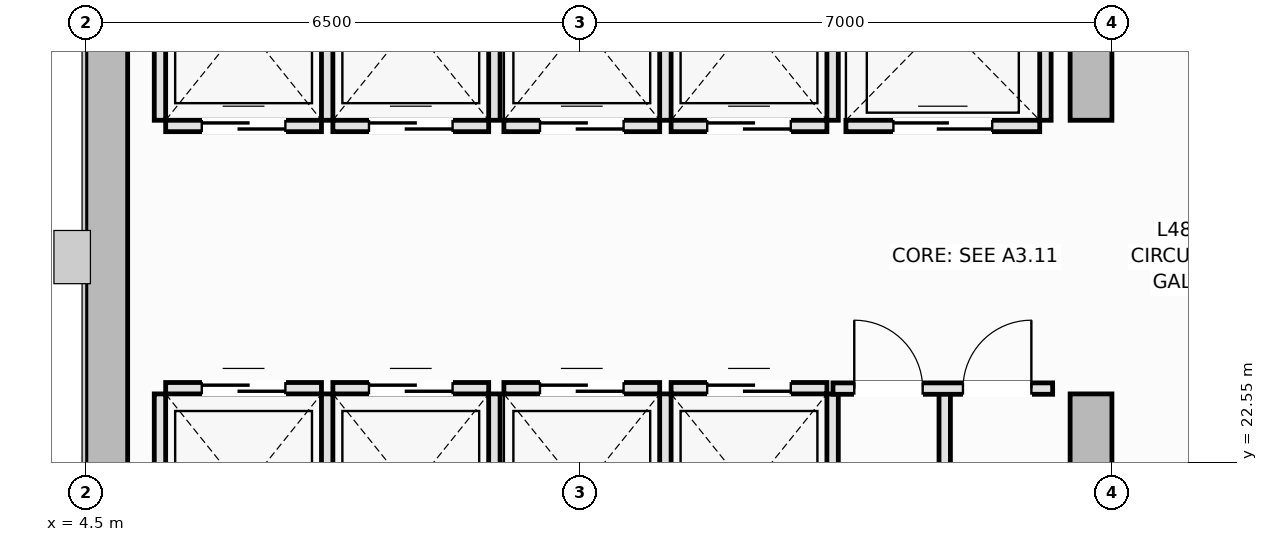
"""IFC4 building model, lengths in metres.
Left out: names, types, materials, properties, quantities, classifications, styles, units other than length and angle.
Written with IfcOpenShell. Run it as: python <this file> out.ifc"""

import sys

from ifc_helpers import new_model, si_unit, direction, frame, frame_2d, origin, place, context, subcontext, project, spatial, rectangle, extrude, element, fill, save


model = new_model("IFC4")
c1 = context("Model", 3, precision=1e-05, world=origin(), true_north=direction((0.0, 1.0)))
c2 = subcontext(c1, "Body", "Model", "MODEL_VIEW")
j1 = project(units=[si_unit("LENGTHUNIT", "METRE"), si_unit("PLANEANGLEUNIT", "RADIAN")], contexts=[c1])
p1 = place(None, origin())
s1 = spatial("IfcSite", under=j1, at=p1, CompositionType="ELEMENT")
p2 = place(p1, origin())
s2 = spatial("IfcBuilding", under=s1, at=p2, CompositionType="ELEMENT")
p3 = place(p2, frame((0.0, 0.0, 183.65)))
s3 = spatial("IfcBuildingStorey", under=s2, at=p3, CompositionType="ELEMENT", Elevation=183.65)
p4 = place(p3, frame((4.775, 14.55, 0.0), z_axis=(0.0, 0.0, 1.0), x_axis=(0.0, 1.0, 0.0)))
e1 = element("IfcWall", 1, at=p4, inside=s3, PredefinedType="SHEAR", context=c2, shape_type="SweptSolid", body=[
    extrude(rectangle(XDim=21.4, YDim=0.55, at=frame_2d((10.7, 0.0))), origin(), (0.0, 0.0, 1.0), 4.4),
])
p5 = place(p3, frame((17.725, 14.55, 0.0), z_axis=(0.0, 0.0, 1.0), x_axis=(0.0, 1.0, 0.0)))
e2 = element("IfcWall", 2, at=p5, inside=s3, PredefinedType="SHEAR", context=c2, shape_type="SweptSolid", body=[
    extrude(rectangle(XDim=8.9, YDim=0.55, at=frame_2d((4.45, 0.0))), origin(), (0.0, 0.0, 1.0), 4.4),
])
p6 = place(p5, frame((4.35, 0.0, 0.0)))
e3 = element("IfcOpeningElement", 3, at=p6, cuts=e2, PredefinedType="OPENING", context=c2, shape_type="SweptSolid", body=[
    extrude(rectangle(XDim=1.1, YDim=2.15, at=frame_2d((0.55, 1.075))), frame((0.0, 0.285, 0.0), z_axis=(0.0, -1.0, 0.0), x_axis=(1.0, 0.0, 0.0)), (0.0, 0.0, 1.0), 0.57),
])
p7 = place(p3, frame((17.725, 27.05, 0.0), z_axis=(0.0, 0.0, 1.0), x_axis=(0.0, 1.0, 0.0)))
e4 = element("IfcWall", 4, at=p7, inside=s3, PredefinedType="SHEAR", context=c2, shape_type="SweptSolid", body=[
    extrude(rectangle(XDim=8.9, YDim=0.55, at=frame_2d((4.45, 0.0))), origin(), (0.0, 0.0, 1.0), 4.4),
])
p8 = place(p7, frame((3.45, 0.0, 0.0)))
e5 = element("IfcOpeningElement", 5, at=p8, cuts=e4, PredefinedType="OPENING", context=c2, shape_type="SweptSolid", body=[
    extrude(rectangle(XDim=1.1, YDim=2.15, at=frame_2d((0.55, 1.075))), frame((0.0, 0.285, 0.0), z_axis=(0.0, -1.0, 0.0), x_axis=(1.0, 0.0, 0.0)), (0.0, 0.0, 1.0), 0.57),
])
p9 = place(p3, frame((5.55, 23.525, 0.0), z_axis=(0.0, 0.0, 1.0), x_axis=(1.0, 0.0, 0.0)))
e6 = element("IfcWall", 6, at=p9, inside=s3, PredefinedType="PARTITIONING", context=c2, shape_type="SweptSolid", body=[
    extrude(rectangle(XDim=2.05, YDim=0.15, at=frame_2d((1.025, 0.0))), origin(), (0.0, 0.0, 1.0), 4.22),
])
p10 = place(p9, frame((0.475, 0.0, 0.0)))
e7 = element("IfcOpeningElement", 7, at=p10, cuts=e6, PredefinedType="OPENING", context=c2, shape_type="SweptSolid", body=[
    extrude(rectangle(XDim=1.1, YDim=2.2, at=frame_2d((0.55, 1.1))), frame((0.0, 0.085, 0.0), z_axis=(0.0, -1.0, 0.0), x_axis=(1.0, 0.0, 0.0)), (0.0, 0.0, 1.0), 0.17),
])
for number, where, z_axis, x_axis in (
    (8, (5.475, 20.9, 0.0), (0.0, 0.0, 1.0), (0.0, 1.0, 0.0)),
    (9, (7.675, 20.9, 0.0), (0.0, 0.0, 1.0), (0.0, 1.0, 0.0)),
):
    element("IfcWall", number, at=place(p3, frame(where, z_axis=z_axis, x_axis=x_axis)), inside=s3, PredefinedType="PARTITIONING", context=c2, shape_type="SweptSolid", body=[
        extrude(rectangle(XDim=2.55, YDim=0.15, at=frame_2d((1.275, 0.0))), origin(), (0.0, 0.0, 1.0), 4.22),
    ])
p11 = place(p3, frame((7.75, 23.525, 0.0), z_axis=(0.0, 0.0, 1.0), x_axis=(1.0, 0.0, 0.0)))
e10 = element("IfcWall", 10, at=p11, inside=s3, PredefinedType="PARTITIONING", context=c2, shape_type="SweptSolid", body=[
    extrude(rectangle(XDim=2.05, YDim=0.15, at=frame_2d((1.025, 0.0))), origin(), (0.0, 0.0, 1.0), 4.22),
])
p12 = place(p11, frame((0.475, 0.0, 0.0)))
e11 = element("IfcOpeningElement", 11, at=p12, cuts=e10, PredefinedType="OPENING", context=c2, shape_type="SweptSolid", body=[
    extrude(rectangle(XDim=1.1, YDim=2.2, at=frame_2d((0.55, 1.1))), frame((0.0, 0.085, 0.0), z_axis=(0.0, -1.0, 0.0), x_axis=(1.0, 0.0, 0.0)), (0.0, 0.0, 1.0), 0.17),
])
p13 = place(p3, frame((9.875, 20.9, 0.0), z_axis=(0.0, 0.0, 1.0), x_axis=(0.0, 1.0, 0.0)))
e12 = element("IfcWall", 12, at=p13, inside=s3, PredefinedType="PARTITIONING", context=c2, shape_type="SweptSolid", body=[
    extrude(rectangle(XDim=2.55, YDim=0.15, at=frame_2d((1.275, 0.0))), origin(), (0.0, 0.0, 1.0), 4.22),
])
p14 = place(p3, frame((5.55, 26.975, 0.0), z_axis=(0.0, 0.0, 1.0), x_axis=(1.0, 0.0, 0.0)))
e13 = element("IfcWall", 13, at=p14, inside=s3, PredefinedType="PARTITIONING", context=c2, shape_type="SweptSolid", body=[
    extrude(rectangle(XDim=2.05, YDim=0.15, at=frame_2d((1.025, 0.0))), origin(), (0.0, 0.0, 1.0), 4.22),
])
p15 = place(p14, frame((0.475, 0.0, 0.0)))
e14 = element("IfcOpeningElement", 14, at=p15, cuts=e13, PredefinedType="OPENING", context=c2, shape_type="SweptSolid", body=[
    extrude(rectangle(XDim=1.1, YDim=2.2, at=frame_2d((0.55, 1.1))), frame((0.0, 0.085, 0.0), z_axis=(0.0, -1.0, 0.0), x_axis=(1.0, 0.0, 0.0)), (0.0, 0.0, 1.0), 0.17),
])
for number, where, z_axis, x_axis in (
    (15, (5.475, 27.05, 0.0), (0.0, 0.0, 1.0), (0.0, 1.0, 0.0)),
    (16, (7.675, 27.05, 0.0), (0.0, 0.0, 1.0), (0.0, 1.0, 0.0)),
):
    element("IfcWall", number, at=place(p3, frame(where, z_axis=z_axis, x_axis=x_axis)), inside=s3, PredefinedType="PARTITIONING", context=c2, shape_type="SweptSolid", body=[
        extrude(rectangle(XDim=2.55, YDim=0.15, at=frame_2d((1.275, 0.0))), origin(), (0.0, 0.0, 1.0), 4.22),
    ])
p16 = place(p3, frame((7.75, 26.975, 0.0), z_axis=(0.0, 0.0, 1.0), x_axis=(1.0, 0.0, 0.0)))
e17 = element("IfcWall", 17, at=p16, inside=s3, PredefinedType="PARTITIONING", context=c2, shape_type="SweptSolid", body=[
    extrude(rectangle(XDim=2.05, YDim=0.15, at=frame_2d((1.025, 0.0))), origin(), (0.0, 0.0, 1.0), 4.22),
])
p17 = place(p16, frame((0.475, 0.0, 0.0)))
e18 = element("IfcOpeningElement", 18, at=p17, cuts=e17, PredefinedType="OPENING", context=c2, shape_type="SweptSolid", body=[
    extrude(rectangle(XDim=1.1, YDim=2.2, at=frame_2d((0.55, 1.1))), frame((0.0, 0.085, 0.0), z_axis=(0.0, -1.0, 0.0), x_axis=(1.0, 0.0, 0.0)), (0.0, 0.0, 1.0), 0.17),
])
p18 = place(p3, frame((9.875, 27.05, 0.0), z_axis=(0.0, 0.0, 1.0), x_axis=(0.0, 1.0, 0.0)))
e19 = element("IfcWall", 19, at=p18, inside=s3, PredefinedType="PARTITIONING", context=c2, shape_type="SweptSolid", body=[
    extrude(rectangle(XDim=2.55, YDim=0.15, at=frame_2d((1.275, 0.0))), origin(), (0.0, 0.0, 1.0), 4.22),
])
p19 = place(p3, frame((10.0, 23.525, 0.0), z_axis=(0.0, 0.0, 1.0), x_axis=(1.0, 0.0, 0.0)))
e20 = element("IfcWall", 20, at=p19, inside=s3, PredefinedType="PARTITIONING", context=c2, shape_type="SweptSolid", body=[
    extrude(rectangle(XDim=2.05, YDim=0.15, at=frame_2d((1.025, 0.0))), origin(), (0.0, 0.0, 1.0), 4.22),
])
p20 = place(p19, frame((0.475, 0.0, 0.0)))
e21 = element("IfcOpeningElement", 21, at=p20, cuts=e20, PredefinedType="OPENING", context=c2, shape_type="SweptSolid", body=[
    extrude(rectangle(XDim=1.1, YDim=2.2, at=frame_2d((0.55, 1.1))), frame((0.0, 0.085, 0.0), z_axis=(0.0, -1.0, 0.0), x_axis=(1.0, 0.0, 0.0)), (0.0, 0.0, 1.0), 0.17),
])
p21 = place(p3, frame((12.125, 20.9, 0.0), z_axis=(0.0, 0.0, 1.0), x_axis=(0.0, 1.0, 0.0)))
e22 = element("IfcWall", 22, at=p21, inside=s3, PredefinedType="PARTITIONING", context=c2, shape_type="SweptSolid", body=[
    extrude(rectangle(XDim=2.55, YDim=0.15, at=frame_2d((1.275, 0.0))), origin(), (0.0, 0.0, 1.0), 4.22),
])
p22 = place(p3, frame((12.2, 23.525, 0.0), z_axis=(0.0, 0.0, 1.0), x_axis=(1.0, 0.0, 0.0)))
e23 = element("IfcWall", 23, at=p22, inside=s3, PredefinedType="PARTITIONING", context=c2, shape_type="SweptSolid", body=[
    extrude(rectangle(XDim=2.05, YDim=0.15, at=frame_2d((1.025, 0.0))), origin(), (0.0, 0.0, 1.0), 4.22),
])
p23 = place(p22, frame((0.475, 0.0, 0.0)))
e24 = element("IfcOpeningElement", 24, at=p23, cuts=e23, PredefinedType="OPENING", context=c2, shape_type="SweptSolid", body=[
    extrude(rectangle(XDim=1.1, YDim=2.2, at=frame_2d((0.55, 1.1))), frame((0.0, 0.085, 0.0), z_axis=(0.0, -1.0, 0.0), x_axis=(1.0, 0.0, 0.0)), (0.0, 0.0, 1.0), 0.17),
])
p24 = place(p3, frame((14.325, 20.9, 0.0), z_axis=(0.0, 0.0, 1.0), x_axis=(0.0, 1.0, 0.0)))
e25 = element("IfcWall", 25, at=p24, inside=s3, PredefinedType="PARTITIONING", context=c2, shape_type="SweptSolid", body=[
    extrude(rectangle(XDim=2.55, YDim=0.15, at=frame_2d((1.275, 0.0))), origin(), (0.0, 0.0, 1.0), 4.22),
])
p25 = place(p3, frame((10.0, 26.975, 0.0), z_axis=(0.0, 0.0, 1.0), x_axis=(1.0, 0.0, 0.0)))
e26 = element("IfcWall", 26, at=p25, inside=s3, PredefinedType="PARTITIONING", context=c2, shape_type="SweptSolid", body=[
    extrude(rectangle(XDim=2.05, YDim=0.15, at=frame_2d((1.025, 0.0))), origin(), (0.0, 0.0, 1.0), 4.22),
])
p26 = place(p25, frame((0.475, 0.0, 0.0)))
e27 = element("IfcOpeningElement", 27, at=p26, cuts=e26, PredefinedType="OPENING", context=c2, shape_type="SweptSolid", body=[
    extrude(rectangle(XDim=1.1, YDim=2.2, at=frame_2d((0.55, 1.1))), frame((0.0, 0.085, 0.0), z_axis=(0.0, -1.0, 0.0), x_axis=(1.0, 0.0, 0.0)), (0.0, 0.0, 1.0), 0.17),
])
p27 = place(p3, frame((12.125, 27.05, 0.0), z_axis=(0.0, 0.0, 1.0), x_axis=(0.0, 1.0, 0.0)))
e28 = element("IfcWall", 28, at=p27, inside=s3, PredefinedType="PARTITIONING", context=c2, shape_type="SweptSolid", body=[
    extrude(rectangle(XDim=2.55, YDim=0.15, at=frame_2d((1.275, 0.0))), origin(), (0.0, 0.0, 1.0), 4.22),
])
p28 = place(p3, frame((12.2, 26.975, 0.0), z_axis=(0.0, 0.0, 1.0), x_axis=(1.0, 0.0, 0.0)))
e29 = element("IfcWall", 29, at=p28, inside=s3, PredefinedType="PARTITIONING", context=c2, shape_type="SweptSolid", body=[
    extrude(rectangle(XDim=2.05, YDim=0.15, at=frame_2d((1.025, 0.0))), origin(), (0.0, 0.0, 1.0), 4.22),
])
p29 = place(p28, frame((0.475, 0.0, 0.0)))
e30 = element("IfcOpeningElement", 30, at=p29, cuts=e29, PredefinedType="OPENING", context=c2, shape_type="SweptSolid", body=[
    extrude(rectangle(XDim=1.1, YDim=2.2, at=frame_2d((0.55, 1.1))), frame((0.0, 0.085, 0.0), z_axis=(0.0, -1.0, 0.0), x_axis=(1.0, 0.0, 0.0)), (0.0, 0.0, 1.0), 0.17),
])
p30 = place(p3, frame((14.325, 27.05, 0.0), z_axis=(0.0, 0.0, 1.0), x_axis=(0.0, 1.0, 0.0)))
e31 = element("IfcWall", 31, at=p30, inside=s3, PredefinedType="PARTITIONING", context=c2, shape_type="SweptSolid", body=[
    extrude(rectangle(XDim=2.55, YDim=0.15, at=frame_2d((1.275, 0.0))), origin(), (0.0, 0.0, 1.0), 4.22),
])
p31 = place(p3, frame((14.5, 26.975, 0.0), z_axis=(0.0, 0.0, 1.0), x_axis=(1.0, 0.0, 0.0)))
e32 = element("IfcWall", 32, at=p31, inside=s3, PredefinedType="PARTITIONING", context=c2, shape_type="SweptSolid", body=[
    extrude(rectangle(XDim=2.55, YDim=0.15, at=frame_2d((1.275, 0.0))), origin(), (0.0, 0.0, 1.0), 4.22),
])
p32 = place(p31, frame((0.625, 0.0, 0.0)))
e33 = element("IfcOpeningElement", 33, at=p32, cuts=e32, PredefinedType="OPENING", context=c2, shape_type="SweptSolid", body=[
    extrude(rectangle(XDim=1.3, YDim=2.2, at=frame_2d((0.65, 1.1))), frame((0.0, 0.085, 0.0), z_axis=(0.0, -1.0, 0.0), x_axis=(1.0, 0.0, 0.0)), (0.0, 0.0, 1.0), 0.17),
])
p33 = place(p3, frame((17.125, 27.05, 0.0), z_axis=(0.0, 0.0, 1.0), x_axis=(0.0, 1.0, 0.0)))
e34 = element("IfcWall", 34, at=p33, inside=s3, PredefinedType="PARTITIONING", context=c2, shape_type="SweptSolid", body=[
    extrude(rectangle(XDim=2.6, YDim=0.15, at=frame_2d((1.3, 0.0))), origin(), (0.0, 0.0, 1.0), 4.22),
])
p34 = place(p3, frame((15.8, 20.85, 0.0), z_axis=(0.0, 0.0, 1.0), x_axis=(0.0, 1.0, 0.0)))
e35 = element("IfcWall", 35, at=p34, inside=s3, PredefinedType="PARTITIONING", context=c2, shape_type="SweptSolid", body=[
    extrude(rectangle(XDim=2.67, YDim=0.15, at=frame_2d((1.335, 0.0))), origin(), (0.0, 0.0, 1.0), 4.22),
])
p35 = place(p3, frame((14.33, 23.52, 0.0), z_axis=(0.0, 0.0, 1.0), x_axis=(1.0, 0.0, 0.0)))
e36 = element("IfcWall", 36, at=p35, inside=s3, PredefinedType="PARTITIONING", context=c2, shape_type="SweptSolid", body=[
    extrude(rectangle(XDim=2.89, YDim=0.15, at=frame_2d((1.445, 0.0))), origin(), (0.0, 0.0, 1.0), 4.22),
])
p36 = place(p35, frame((0.28, 0.0, 0.0)))
e37 = element("IfcOpeningElement", 37, at=p36, cuts=e36, PredefinedType="OPENING", context=c2, shape_type="SweptSolid", body=[
    extrude(rectangle(XDim=0.9, YDim=2.1, at=frame_2d((0.45, 1.05))), frame((0.0, 0.085, 0.0), z_axis=(0.0, -1.0, 0.0), x_axis=(1.0, 0.0, 0.0)), (0.0, 0.0, 1.0), 0.17),
])
p37 = place(p35, frame((1.71, 0.0, 0.0)))
e38 = element("IfcOpeningElement", 38, at=p37, cuts=e36, PredefinedType="OPENING", context=c2, shape_type="SweptSolid", body=[
    extrude(rectangle(XDim=0.9, YDim=2.1, at=frame_2d((0.45, 1.05))), frame((0.0, 0.085, 0.0), z_axis=(0.0, -1.0, 0.0), x_axis=(1.0, 0.0, 0.0)), (0.0, 0.0, 1.0), 0.17),
])
p38 = place(p10, origin())
e39 = element("IfcDoor", 39, at=p38, inside=s3, OperationType="DOUBLE_DOOR_SLIDING", PredefinedType="DOOR", context=c2, shape_type="SweptSolid", body=[
    extrude(rectangle(XDim=1.1, YDim=2.2, at=frame_2d((0.55, 1.1))), frame((0.0, 0.025, 0.0), z_axis=(0.0, -1.0, 0.0), x_axis=(1.0, 0.0, 0.0)), (0.0, 0.0, 1.0), 0.05),
])
fill(e7, e39)
p39 = place(p12, origin())
e40 = element("IfcDoor", 40, at=p39, inside=s3, OperationType="DOUBLE_DOOR_SLIDING", PredefinedType="DOOR", context=c2, shape_type="SweptSolid", body=[
    extrude(rectangle(XDim=1.1, YDim=2.2, at=frame_2d((0.55, 1.1))), frame((0.0, 0.025, 0.0), z_axis=(0.0, -1.0, 0.0), x_axis=(1.0, 0.0, 0.0)), (0.0, 0.0, 1.0), 0.05),
])
fill(e11, e40)
p40 = place(p15, origin())
e41 = element("IfcDoor", 41, at=p40, inside=s3, OperationType="DOUBLE_DOOR_SLIDING", PredefinedType="DOOR", context=c2, shape_type="SweptSolid", body=[
    extrude(rectangle(XDim=1.1, YDim=2.2, at=frame_2d((0.55, 1.1))), frame((0.0, 0.025, 0.0), z_axis=(0.0, -1.0, 0.0), x_axis=(1.0, 0.0, 0.0)), (0.0, 0.0, 1.0), 0.05),
])
fill(e14, e41)
p41 = place(p17, origin())
e42 = element("IfcDoor", 42, at=p41, inside=s3, OperationType="DOUBLE_DOOR_SLIDING", PredefinedType="DOOR", context=c2, shape_type="SweptSolid", body=[
    extrude(rectangle(XDim=1.1, YDim=2.2, at=frame_2d((0.55, 1.1))), frame((0.0, 0.025, 0.0), z_axis=(0.0, -1.0, 0.0), x_axis=(1.0, 0.0, 0.0)), (0.0, 0.0, 1.0), 0.05),
])
fill(e18, e42)
p42 = place(p20, origin())
e43 = element("IfcDoor", 43, at=p42, inside=s3, OperationType="DOUBLE_DOOR_SLIDING", PredefinedType="DOOR", context=c2, shape_type="SweptSolid", body=[
    extrude(rectangle(XDim=1.1, YDim=2.2, at=frame_2d((0.55, 1.1))), frame((0.0, 0.025, 0.0), z_axis=(0.0, -1.0, 0.0), x_axis=(1.0, 0.0, 0.0)), (0.0, 0.0, 1.0), 0.05),
])
fill(e21, e43)
p43 = place(p23, origin())
e44 = element("IfcDoor", 44, at=p43, inside=s3, OperationType="DOUBLE_DOOR_SLIDING", PredefinedType="DOOR", context=c2, shape_type="SweptSolid", body=[
    extrude(rectangle(XDim=1.1, YDim=2.2, at=frame_2d((0.55, 1.1))), frame((0.0, 0.025, 0.0), z_axis=(0.0, -1.0, 0.0), x_axis=(1.0, 0.0, 0.0)), (0.0, 0.0, 1.0), 0.05),
])
fill(e24, e44)
p44 = place(p26, origin())
e45 = element("IfcDoor", 45, at=p44, inside=s3, OperationType="DOUBLE_DOOR_SLIDING", PredefinedType="DOOR", context=c2, shape_type="SweptSolid", body=[
    extrude(rectangle(XDim=1.1, YDim=2.2, at=frame_2d((0.55, 1.1))), frame((0.0, 0.025, 0.0), z_axis=(0.0, -1.0, 0.0), x_axis=(1.0, 0.0, 0.0)), (0.0, 0.0, 1.0), 0.05),
])
fill(e27, e45)
p45 = place(p29, origin())
e46 = element("IfcDoor", 46, at=p45, inside=s3, OperationType="DOUBLE_DOOR_SLIDING", PredefinedType="DOOR", context=c2, shape_type="SweptSolid", body=[
    extrude(rectangle(XDim=1.1, YDim=2.2, at=frame_2d((0.55, 1.1))), frame((0.0, 0.025, 0.0), z_axis=(0.0, -1.0, 0.0), x_axis=(1.0, 0.0, 0.0)), (0.0, 0.0, 1.0), 0.05),
])
fill(e30, e46)
p46 = place(p32, origin())
e47 = element("IfcDoor", 47, at=p46, inside=s3, OperationType="DOUBLE_DOOR_SLIDING", PredefinedType="DOOR", context=c2, shape_type="SweptSolid", body=[
    extrude(rectangle(XDim=1.3, YDim=2.2, at=frame_2d((0.65, 1.1))), frame((0.0, 0.025, 0.0), z_axis=(0.0, -1.0, 0.0), x_axis=(1.0, 0.0, 0.0)), (0.0, 0.0, 1.0), 0.05),
])
fill(e33, e47)
p47 = place(p36, origin())
e48 = element("IfcDoor", 48, at=p47, inside=s3, OperationType="SINGLE_SWING_LEFT", PredefinedType="DOOR", context=c2, shape_type="SweptSolid", body=[
    extrude(rectangle(XDim=0.9, YDim=2.1, at=frame_2d((0.45, 1.05))), frame((0.0, 0.025, 0.0), z_axis=(0.0, -1.0, 0.0), x_axis=(1.0, 0.0, 0.0)), (0.0, 0.0, 1.0), 0.05),
])
fill(e37, e48)
p48 = place(p37, origin())
e49 = element("IfcDoor", 49, at=p48, inside=s3, OperationType="SINGLE_SWING_RIGHT", PredefinedType="DOOR", context=c2, shape_type="SweptSolid", body=[
    extrude(rectangle(XDim=0.9, YDim=2.1, at=frame_2d((0.45, 1.05))), frame((0.0, 0.025, 0.0), z_axis=(0.0, -1.0, 0.0), x_axis=(1.0, 0.0, 0.0)), (0.0, 0.0, 1.0), 0.05),
])
fill(e38, e49)
save(model, sys.argv[1])
